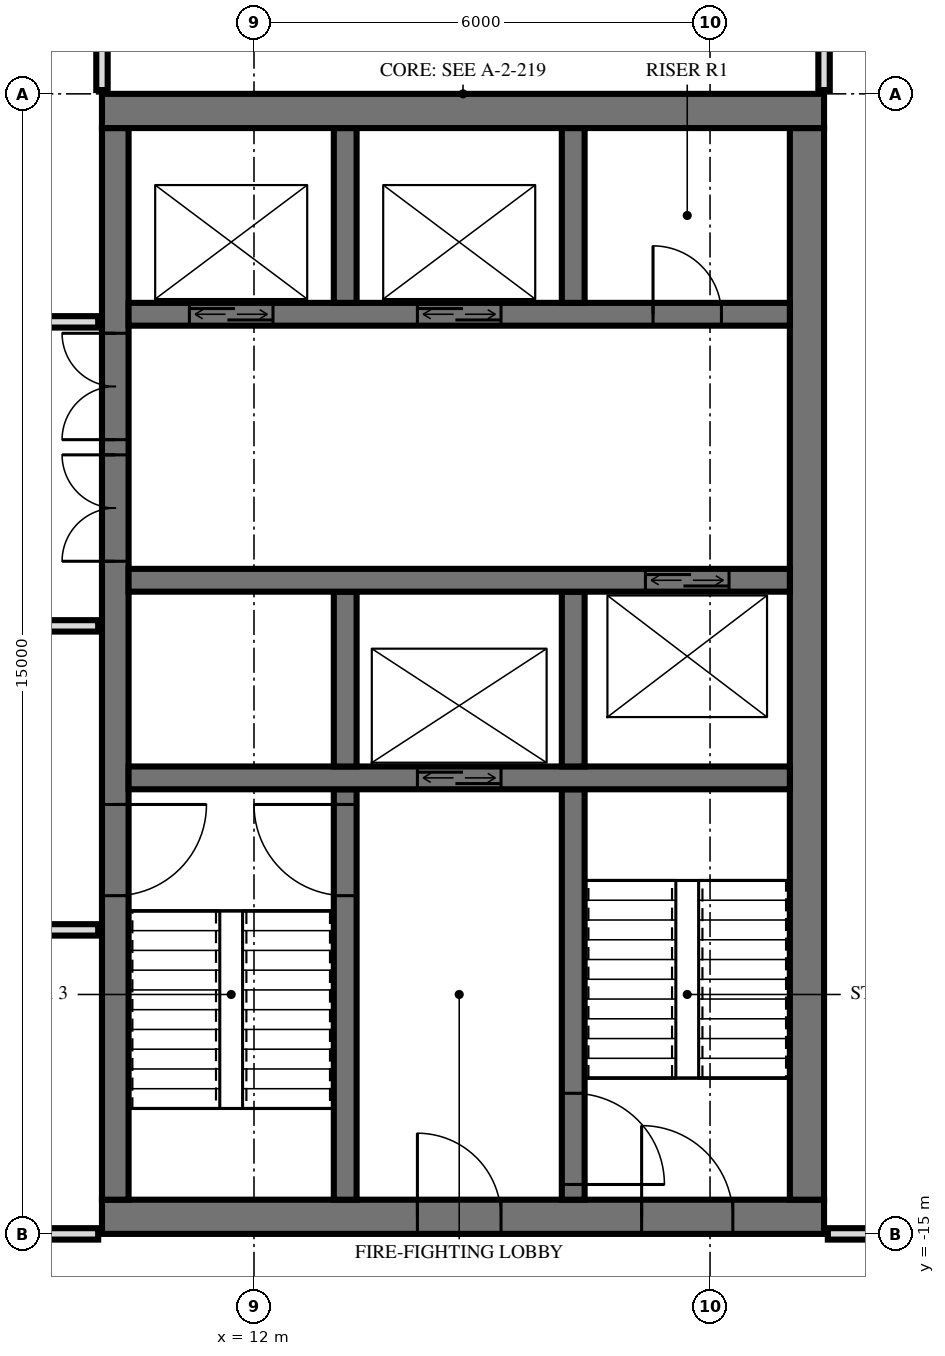
"""IFC4 building model, lengths in metres.
Left out: names, types, materials, properties, quantities, classifications, styles, units other than length and angle.
Written with IfcOpenShell. Run it as: python <this file> out.ifc"""

import sys

from ifc_helpers import new_model, si_unit, direction, frame, frame_2d, origin, place, context, subcontext, project, spatial, rectangle, extrude, element, fill, save


model = new_model("IFC4")
c1 = context("Model", 3, precision=1e-05, world=origin(), true_north=direction((0.0, 1.0)))
c2 = subcontext(c1, "Body", "Model", "MODEL_VIEW")
j1 = project(units=[si_unit("LENGTHUNIT", "METRE"), si_unit("PLANEANGLEUNIT", "RADIAN")], contexts=[c1])
p1 = place(None, origin())
s1 = spatial("IfcSite", under=j1, at=p1, CompositionType="ELEMENT")
p2 = place(p1, origin())
s2 = spatial("IfcBuilding", under=s1, at=p2, CompositionType="ELEMENT")
p3 = place(p2, frame((0.0, 0.0, 318.6)))
s3 = spatial("IfcBuildingStorey", under=s2, at=p3, CompositionType="ELEMENT", Elevation=318.6)
p4 = place(p3, frame((10.0, -0.225, 0.0), z_axis=(0.0, 0.0, 1.0), x_axis=(1.0, 0.0, 0.0)))
e1 = element("IfcWall", 1, at=p4, inside=s3, PredefinedType="SHEAR", context=c2, shape_type="SweptSolid", body=[
    extrude(rectangle(XDim=9.5, YDim=0.45, at=frame_2d((4.75, 0.0))), origin(), (0.0, 0.0, 1.0), 4.0),
])
p5 = place(p3, frame((10.0, -14.775, 0.0), z_axis=(0.0, 0.0, 1.0), x_axis=(1.0, 0.0, 0.0)))
e2 = element("IfcWall", 2, at=p5, inside=s3, PredefinedType="SHEAR", context=c2, shape_type="SweptSolid", body=[
    extrude(rectangle(XDim=9.5, YDim=0.45, at=frame_2d((4.75, 0.0))), origin(), (0.0, 0.0, 1.0), 4.0),
])
p6 = place(p5, frame((7.1, 0.0, 0.0)))
e3 = element("IfcOpeningElement", 3, at=p6, cuts=e2, PredefinedType="OPENING", context=c2, shape_type="SweptSolid", body=[
    extrude(rectangle(XDim=1.2, YDim=2.1, at=frame_2d((0.6, 1.05))), frame((0.0, 0.235, 0.0), z_axis=(0.0, -1.0, 0.0), x_axis=(1.0, 0.0, 0.0)), (0.0, 0.0, 1.0), 0.47),
])
p7 = place(p5, frame((4.15, 0.0, 0.0)))
e4 = element("IfcOpeningElement", 4, at=p7, cuts=e2, PredefinedType="OPENING", context=c2, shape_type="SweptSolid", body=[
    extrude(rectangle(XDim=1.1, YDim=2.1, at=frame_2d((0.55, 1.05))), frame((0.0, 0.235, 0.0), z_axis=(0.0, -1.0, 0.0), x_axis=(1.0, 0.0, 0.0)), (0.0, 0.0, 1.0), 0.47),
])
p8 = place(p3, frame((10.175, -14.55, 0.0), z_axis=(0.0, 0.0, 1.0), x_axis=(0.0, 1.0, 0.0)))
e5 = element("IfcWall", 5, at=p8, inside=s3, PredefinedType="SHEAR", context=c2, shape_type="SweptSolid", body=[
    extrude(rectangle(XDim=14.1, YDim=0.35, at=frame_2d((7.05, 0.0))), origin(), (0.0, 0.0, 1.0), 4.0),
])
p9 = place(p8, frame((8.4, 0.0, 0.0)))
e6 = element("IfcOpeningElement", 6, at=p9, cuts=e5, PredefinedType="OPENING", context=c2, shape_type="SweptSolid", body=[
    extrude(rectangle(XDim=1.4, YDim=2.4, at=frame_2d((0.7, 1.2))), frame((0.0, 0.185, 0.0), z_axis=(0.0, -1.0, 0.0), x_axis=(1.0, 0.0, 0.0)), (0.0, 0.0, 1.0), 0.37),
])
p10 = place(p8, frame((10.0, 0.0, 0.0)))
e7 = element("IfcOpeningElement", 7, at=p10, cuts=e5, PredefinedType="OPENING", context=c2, shape_type="SweptSolid", body=[
    extrude(rectangle(XDim=1.4, YDim=2.4, at=frame_2d((0.7, 1.2))), frame((0.0, 0.185, 0.0), z_axis=(0.0, -1.0, 0.0), x_axis=(1.0, 0.0, 0.0)), (0.0, 0.0, 1.0), 0.37),
])
p11 = place(p8, frame((4.0, 0.0, 0.0)))
e8 = element("IfcOpeningElement", 8, at=p11, cuts=e5, PredefinedType="OPENING", context=c2, shape_type="SweptSolid", body=[
    extrude(rectangle(XDim=1.2, YDim=2.1, at=frame_2d((0.6, 1.05))), frame((0.0, 0.185, 0.0), z_axis=(0.0, -1.0, 0.0), x_axis=(1.0, 0.0, 0.0)), (0.0, 0.0, 1.0), 0.37),
])
p12 = place(p3, frame((19.275, -14.55, 0.0), z_axis=(0.0, 0.0, 1.0), x_axis=(0.0, 1.0, 0.0)))
e9 = element("IfcWall", 9, at=p12, inside=s3, PredefinedType="SHEAR", context=c2, shape_type="SweptSolid", body=[
    extrude(rectangle(XDim=14.1, YDim=0.45, at=frame_2d((7.05, 0.0))), origin(), (0.0, 0.0, 1.0), 4.0),
])
p13 = place(p3, frame((10.35, -2.9, 0.0), z_axis=(0.0, 0.0, 1.0), x_axis=(1.0, 0.0, 0.0)))
e10 = element("IfcWall", 10, at=p13, inside=s3, PredefinedType="SHEAR", context=c2, shape_type="SweptSolid", body=[
    extrude(rectangle(XDim=8.7, YDim=0.3, at=frame_2d((4.35, 0.0))), origin(), (0.0, 0.0, 1.0), 4.0),
])
p14 = place(p13, frame((0.8, 0.0, 0.0)))
e11 = element("IfcOpeningElement", 11, at=p14, cuts=e10, PredefinedType="OPENING", context=c2, shape_type="SweptSolid", body=[
    extrude(rectangle(XDim=1.1, YDim=2.1, at=frame_2d((0.55, 1.05))), frame((0.0, 0.16, 0.0), z_axis=(0.0, -1.0, 0.0), x_axis=(1.0, 0.0, 0.0)), (0.0, 0.0, 1.0), 0.32),
])
p15 = place(p13, frame((3.8, 0.0, 0.0)))
e12 = element("IfcOpeningElement", 12, at=p15, cuts=e10, PredefinedType="OPENING", context=c2, shape_type="SweptSolid", body=[
    extrude(rectangle(XDim=1.1, YDim=2.1, at=frame_2d((0.55, 1.05))), frame((0.0, 0.16, 0.0), z_axis=(0.0, -1.0, 0.0), x_axis=(1.0, 0.0, 0.0)), (0.0, 0.0, 1.0), 0.32),
])
p16 = place(p13, frame((6.9, 0.0, 0.0)))
e13 = element("IfcOpeningElement", 13, at=p16, cuts=e10, PredefinedType="OPENING", context=c2, shape_type="SweptSolid", body=[
    extrude(rectangle(XDim=0.9, YDim=2.1, at=frame_2d((0.45, 1.05))), frame((0.0, 0.16, 0.0), z_axis=(0.0, -1.0, 0.0), x_axis=(1.0, 0.0, 0.0)), (0.0, 0.0, 1.0), 0.32),
])
p17 = place(p3, frame((10.35, -6.4, 0.0), z_axis=(0.0, 0.0, 1.0), x_axis=(1.0, 0.0, 0.0)))
e14 = element("IfcWall", 14, at=p17, inside=s3, PredefinedType="SHEAR", context=c2, shape_type="SweptSolid", body=[
    extrude(rectangle(XDim=8.7, YDim=0.3, at=frame_2d((4.35, 0.0))), origin(), (0.0, 0.0, 1.0), 4.0),
])
p18 = place(p17, frame((6.8, 0.0, 0.0)))
e15 = element("IfcOpeningElement", 15, at=p18, cuts=e14, PredefinedType="OPENING", context=c2, shape_type="SweptSolid", body=[
    extrude(rectangle(XDim=1.1, YDim=2.1, at=frame_2d((0.55, 1.05))), frame((0.0, 0.16, 0.0), z_axis=(0.0, -1.0, 0.0), x_axis=(1.0, 0.0, 0.0)), (0.0, 0.0, 1.0), 0.32),
])
p19 = place(p3, frame((10.35, -9.0, 0.0), z_axis=(0.0, 0.0, 1.0), x_axis=(1.0, 0.0, 0.0)))
e16 = element("IfcWall", 16, at=p19, inside=s3, PredefinedType="SHEAR", context=c2, shape_type="SweptSolid", body=[
    extrude(rectangle(XDim=8.7, YDim=0.3, at=frame_2d((4.35, 0.0))), origin(), (0.0, 0.0, 1.0), 4.0),
])
p20 = place(p19, frame((3.8, 0.0, 0.0)))
e17 = element("IfcOpeningElement", 17, at=p20, cuts=e16, PredefinedType="OPENING", context=c2, shape_type="SweptSolid", body=[
    extrude(rectangle(XDim=1.1, YDim=2.1, at=frame_2d((0.55, 1.05))), frame((0.0, 0.16, 0.0), z_axis=(0.0, -1.0, 0.0), x_axis=(1.0, 0.0, 0.0)), (0.0, 0.0, 1.0), 0.32),
])
for number, where, z_axis, x_axis in (
    (18, (13.2, -2.75, 0.0), (0.0, 0.0, 1.0), (0.0, 1.0, 0.0)),
    (19, (13.2, -8.85, 0.0), (0.0, 0.0, 1.0), (0.0, 1.0, 0.0)),
):
    element("IfcWall", number, at=place(p3, frame(where, z_axis=z_axis, x_axis=x_axis)), inside=s3, PredefinedType="SHEAR", context=c2, shape_type="SweptSolid", body=[
        extrude(rectangle(XDim=2.3, YDim=0.3, at=frame_2d((1.15, 0.0))), origin(), (0.0, 0.0, 1.0), 4.0),
    ])
p21 = place(p3, frame((13.2, -14.55, 0.0), z_axis=(0.0, 0.0, 1.0), x_axis=(0.0, 1.0, 0.0)))
e20 = element("IfcWall", 20, at=p21, inside=s3, PredefinedType="SHEAR", context=c2, shape_type="SweptSolid", body=[
    extrude(rectangle(XDim=5.4, YDim=0.3, at=frame_2d((2.7, 0.0))), origin(), (0.0, 0.0, 1.0), 4.0),
])
p22 = place(p21, frame((4.0, 0.0, 0.0)))
e21 = element("IfcOpeningElement", 21, at=p22, cuts=e20, PredefinedType="OPENING", context=c2, shape_type="SweptSolid", body=[
    extrude(rectangle(XDim=1.2, YDim=2.1, at=frame_2d((0.6, 1.05))), frame((0.0, 0.16, 0.0), z_axis=(0.0, -1.0, 0.0), x_axis=(1.0, 0.0, 0.0)), (0.0, 0.0, 1.0), 0.32),
])
for number, where, z_axis, x_axis in (
    (22, (16.2, -2.75, 0.0), (0.0, 0.0, 1.0), (0.0, 1.0, 0.0)),
    (23, (16.2, -8.85, 0.0), (0.0, 0.0, 1.0), (0.0, 1.0, 0.0)),
):
    element("IfcWall", number, at=place(p3, frame(where, z_axis=z_axis, x_axis=x_axis)), inside=s3, PredefinedType="SHEAR", context=c2, shape_type="SweptSolid", body=[
        extrude(rectangle(XDim=2.3, YDim=0.3, at=frame_2d((1.15, 0.0))), origin(), (0.0, 0.0, 1.0), 4.0),
    ])
p23 = place(p3, frame((16.2, -14.55, 0.0), z_axis=(0.0, 0.0, 1.0), x_axis=(0.0, 1.0, 0.0)))
e24 = element("IfcWall", 24, at=p23, inside=s3, PredefinedType="SHEAR", context=c2, shape_type="SweptSolid", body=[
    extrude(rectangle(XDim=5.4, YDim=0.3, at=frame_2d((2.7, 0.0))), origin(), (0.0, 0.0, 1.0), 4.0),
])
p24 = place(p23, frame((0.2, 0.0, 0.0)))
e25 = element("IfcOpeningElement", 25, at=p24, cuts=e24, PredefinedType="OPENING", context=c2, shape_type="SweptSolid", body=[
    extrude(rectangle(XDim=1.2, YDim=2.1, at=frame_2d((0.6, 1.05))), frame((0.0, 0.16, 0.0), z_axis=(0.0, -1.0, 0.0), x_axis=(1.0, 0.0, 0.0)), (0.0, 0.0, 1.0), 0.32),
])
p25 = place(p3, frame((19.5, 0.05, 0.0), z_axis=(0.0, 0.0, 1.0), x_axis=(0.0, 1.0, 0.0)))
e26 = element("IfcWall", 26, at=p25, inside=s3, PredefinedType="PARTITIONING", context=c2, shape_type="SweptSolid", body=[
    extrude(rectangle(XDim=4.403, YDim=0.15, at=frame_2d((2.202, 0.0))), origin(), (0.0, 0.0, 1.0), 3.72),
])
p26 = place(p3, frame((10.0, 0.05, 0.0), z_axis=(0.0, 0.0, 1.0), x_axis=(0.0, 1.0, 0.0)))
e27 = element("IfcWall", 27, at=p26, inside=s3, PredefinedType="PARTITIONING", context=c2, shape_type="SweptSolid", body=[
    extrude(rectangle(XDim=4.702, YDim=0.15, at=frame_2d((2.351, 0.0))), origin(), (0.0, 0.0, 1.0), 3.72),
])
p27 = place(p3, frame((-3.506, -15.0, 0.0), z_axis=(0.0, 0.0, 1.0), x_axis=(1.0, 0.0, 0.0)))
e28 = element("IfcWall", 28, at=p27, inside=s3, PredefinedType="PARTITIONING", context=c2, shape_type="SweptSolid", body=[
    extrude(rectangle(XDim=13.456, YDim=0.15, at=frame_2d((6.728, 0.0))), origin(), (0.0, 0.0, 1.0), 3.084),
])
p28 = place(p27, frame((6.253, 0.0, 0.0)))
e29 = element("IfcOpeningElement", 29, at=p28, cuts=e28, PredefinedType="OPENING", context=c2, shape_type="SweptSolid", body=[
    extrude(rectangle(XDim=1.0, YDim=2.1, at=frame_2d((0.5, 1.05))), frame((0.0, 0.085, 0.0), z_axis=(0.0, -1.0, 0.0), x_axis=(1.0, 0.0, 0.0)), (0.0, 0.0, 1.0), 0.17),
])
p29 = place(p3, frame((19.55, -15.0, 0.0), z_axis=(0.0, 0.0, 1.0), x_axis=(1.0, 0.0, 0.0)))
e30 = element("IfcWall", 30, at=p29, inside=s3, PredefinedType="PARTITIONING", context=c2, shape_type="SweptSolid", body=[
    extrude(rectangle(XDim=3.49, YDim=0.15, at=frame_2d((1.745, 0.0))), origin(), (0.0, 0.0, 1.0), 3.72),
])
p30 = place(p29, frame((1.311, 0.0, 0.0)))
e31 = element("IfcOpeningElement", 31, at=p30, cuts=e30, PredefinedType="OPENING", context=c2, shape_type="SweptSolid", body=[
    extrude(rectangle(XDim=1.0, YDim=2.1, at=frame_2d((0.5, 1.05))), frame((0.0, 0.085, 0.0), z_axis=(0.0, -1.0, 0.0), x_axis=(1.0, 0.0, 0.0)), (0.0, 0.0, 1.0), 0.17),
])
p31 = place(p3, frame((-9.95, -11.0, 0.0), z_axis=(0.0, 0.0, 1.0), x_axis=(1.0, 0.0, 0.0)))
e32 = element("IfcWall", 32, at=p31, inside=s3, PredefinedType="PARTITIONING", context=c2, shape_type="SweptSolid", body=[
    extrude(rectangle(XDim=19.9, YDim=0.15, at=frame_2d((9.95, 0.0))), origin(), (0.0, 0.0, 1.0), 3.72),
])
p32 = place(p31, frame((9.45, 0.0, 0.0)))
e33 = element("IfcOpeningElement", 33, at=p32, cuts=e32, PredefinedType="OPENING", context=c2, shape_type="SweptSolid", body=[
    extrude(rectangle(XDim=1.0, YDim=2.1, at=frame_2d((0.5, 1.05))), frame((0.0, 0.085, 0.0), z_axis=(0.0, -1.0, 0.0), x_axis=(1.0, 0.0, 0.0)), (0.0, 0.0, 1.0), 0.17),
])
p33 = place(p31, frame((15.45, 0.0, 0.0)))
e34 = element("IfcOpeningElement", 34, at=p33, cuts=e32, PredefinedType="OPENING", context=c2, shape_type="SweptSolid", body=[
    extrude(rectangle(XDim=1.0, YDim=2.1, at=frame_2d((0.5, 1.05))), frame((0.0, 0.085, 0.0), z_axis=(0.0, -1.0, 0.0), x_axis=(1.0, 0.0, 0.0)), (0.0, 0.0, 1.0), 0.17),
])
p34 = place(p3, frame((-9.95, -7.0, 0.0), z_axis=(0.0, 0.0, 1.0), x_axis=(1.0, 0.0, 0.0)))
e35 = element("IfcWall", 35, at=p34, inside=s3, PredefinedType="PARTITIONING", context=c2, shape_type="SweptSolid", body=[
    extrude(rectangle(XDim=19.9, YDim=0.15, at=frame_2d((9.95, 0.0))), origin(), (0.0, 0.0, 1.0), 3.72),
])
p35 = place(p34, frame((9.45, 0.0, 0.0)))
e36 = element("IfcOpeningElement", 36, at=p35, cuts=e35, PredefinedType="OPENING", context=c2, shape_type="SweptSolid", body=[
    extrude(rectangle(XDim=1.0, YDim=2.1, at=frame_2d((0.5, 1.05))), frame((0.0, 0.085, 0.0), z_axis=(0.0, -1.0, 0.0), x_axis=(1.0, 0.0, 0.0)), (0.0, 0.0, 1.0), 0.17),
])
p36 = place(p34, frame((3.45, 0.0, 0.0)))
e37 = element("IfcOpeningElement", 37, at=p36, cuts=e35, PredefinedType="OPENING", context=c2, shape_type="SweptSolid", body=[
    extrude(rectangle(XDim=1.0, YDim=2.1, at=frame_2d((0.5, 1.05))), frame((0.0, 0.085, 0.0), z_axis=(0.0, -1.0, 0.0), x_axis=(1.0, 0.0, 0.0)), (0.0, 0.0, 1.0), 0.17),
])
p37 = place(p3, frame((-9.95, -3.0, 0.0), z_axis=(0.0, 0.0, 1.0), x_axis=(1.0, 0.0, 0.0)))
e38 = element("IfcWall", 38, at=p37, inside=s3, PredefinedType="PARTITIONING", context=c2, shape_type="SweptSolid", body=[
    extrude(rectangle(XDim=19.9, YDim=0.15, at=frame_2d((9.95, 0.0))), origin(), (0.0, 0.0, 1.0), 3.72),
])
p38 = place(p37, frame((1.95, 0.0, 0.0)))
e39 = element("IfcOpeningElement", 39, at=p38, cuts=e38, PredefinedType="OPENING", context=c2, shape_type="SweptSolid", body=[
    extrude(rectangle(XDim=1.0, YDim=2.1, at=frame_2d((0.5, 1.05))), frame((0.0, 0.085, 0.0), z_axis=(0.0, -1.0, 0.0), x_axis=(1.0, 0.0, 0.0)), (0.0, 0.0, 1.0), 0.17),
])
p39 = place(p37, frame((5.95, 0.0, 0.0)))
e40 = element("IfcOpeningElement", 40, at=p39, cuts=e38, PredefinedType="OPENING", context=c2, shape_type="SweptSolid", body=[
    extrude(rectangle(XDim=1.0, YDim=2.1, at=frame_2d((0.5, 1.05))), frame((0.0, 0.085, 0.0), z_axis=(0.0, -1.0, 0.0), x_axis=(1.0, 0.0, 0.0)), (0.0, 0.0, 1.0), 0.17),
])
p40 = place(p37, frame((8.7, 0.0, 0.0)))
e41 = element("IfcOpeningElement", 41, at=p40, cuts=e38, PredefinedType="OPENING", context=c2, shape_type="SweptSolid", body=[
    extrude(rectangle(XDim=1.0, YDim=2.1, at=frame_2d((0.5, 1.05))), frame((0.0, 0.085, 0.0), z_axis=(0.0, -1.0, 0.0), x_axis=(1.0, 0.0, 0.0)), (0.0, 0.0, 1.0), 0.17),
])
p41 = place(p37, frame((14.7, 0.0, 0.0)))
e42 = element("IfcOpeningElement", 42, at=p41, cuts=e38, PredefinedType="OPENING", context=c2, shape_type="SweptSolid", body=[
    extrude(rectangle(XDim=1.0, YDim=2.1, at=frame_2d((0.5, 1.05))), frame((0.0, 0.085, 0.0), z_axis=(0.0, -1.0, 0.0), x_axis=(1.0, 0.0, 0.0)), (0.0, 0.0, 1.0), 0.17),
])
p42 = place(p14, origin())
e43 = element("IfcDoor", 43, at=p42, inside=s3, OperationType="DOUBLE_DOOR_SLIDING", PredefinedType="USERDEFINED", context=c2, shape_type="SweptSolid", body=[
    extrude(rectangle(XDim=1.1, YDim=2.1, at=frame_2d((0.55, 1.05))), frame((0.0, 0.025, 0.0), z_axis=(0.0, -1.0, 0.0), x_axis=(1.0, 0.0, 0.0)), (0.0, 0.0, 1.0), 0.05),
])
fill(e11, e43)
p43 = place(p15, origin())
e44 = element("IfcDoor", 44, at=p43, inside=s3, OperationType="DOUBLE_DOOR_SLIDING", PredefinedType="USERDEFINED", context=c2, shape_type="SweptSolid", body=[
    extrude(rectangle(XDim=1.1, YDim=2.1, at=frame_2d((0.55, 1.05))), frame((0.0, 0.025, 0.0), z_axis=(0.0, -1.0, 0.0), x_axis=(1.0, 0.0, 0.0)), (0.0, 0.0, 1.0), 0.05),
])
fill(e12, e44)
p44 = place(p20, origin())
e45 = element("IfcDoor", 45, at=p44, inside=s3, OperationType="DOUBLE_DOOR_SLIDING", PredefinedType="USERDEFINED", context=c2, shape_type="SweptSolid", body=[
    extrude(rectangle(XDim=1.1, YDim=2.1, at=frame_2d((0.55, 1.05))), frame((0.0, 0.025, 0.0), z_axis=(0.0, -1.0, 0.0), x_axis=(1.0, 0.0, 0.0)), (0.0, 0.0, 1.0), 0.05),
])
fill(e17, e45)
p45 = place(p18, origin())
e46 = element("IfcDoor", 46, at=p45, inside=s3, OperationType="DOUBLE_DOOR_SLIDING", PredefinedType="USERDEFINED", context=c2, shape_type="SweptSolid", body=[
    extrude(rectangle(XDim=1.1, YDim=2.1, at=frame_2d((0.55, 1.05))), frame((0.0, 0.025, 0.0), z_axis=(0.0, -1.0, 0.0), x_axis=(1.0, 0.0, 0.0)), (0.0, 0.0, 1.0), 0.05),
])
fill(e15, e46)
p46 = place(p9, origin())
e47 = element("IfcDoor", 47, at=p46, inside=s3, OperationType="DOUBLE_DOOR_SINGLE_SWING", PredefinedType="DOOR", context=c2, shape_type="SweptSolid", body=[
    extrude(rectangle(XDim=1.4, YDim=2.4, at=frame_2d((0.7, 1.2))), frame((0.0, 0.025, 0.0), z_axis=(0.0, -1.0, 0.0), x_axis=(1.0, 0.0, 0.0)), (0.0, 0.0, 1.0), 0.05),
])
fill(e6, e47)
p47 = place(p10, origin())
e48 = element("IfcDoor", 48, at=p47, inside=s3, OperationType="DOUBLE_DOOR_SINGLE_SWING", PredefinedType="DOOR", context=c2, shape_type="SweptSolid", body=[
    extrude(rectangle(XDim=1.4, YDim=2.4, at=frame_2d((0.7, 1.2))), frame((0.0, 0.025, 0.0), z_axis=(0.0, -1.0, 0.0), x_axis=(1.0, 0.0, 0.0)), (0.0, 0.0, 1.0), 0.05),
])
fill(e7, e48)
p48 = place(p11, frame((0.6, 0.0, 0.0), z_axis=(0.0, 0.0, 1.0), x_axis=(-1.0, 0.0, 0.0)))
e49 = element("IfcDoor", 49, at=p48, inside=s3, OperationType="SINGLE_SWING_RIGHT", PredefinedType="DOOR", context=c2, shape_type="SweptSolid", body=[
    extrude(rectangle(XDim=1.2, YDim=2.1, at=frame_2d((0.0, 1.05))), frame((0.0, -0.025, 0.0), z_axis=(0.0, 1.0, 0.0), x_axis=(-1.0, 0.0, 0.0)), (0.0, 0.0, 1.0), 0.05),
])
fill(e8, e49)
p49 = place(p6, origin())
e50 = element("IfcDoor", 50, at=p49, inside=s3, OperationType="SINGLE_SWING_RIGHT", PredefinedType="DOOR", context=c2, shape_type="SweptSolid", body=[
    extrude(rectangle(XDim=1.2, YDim=2.1, at=frame_2d((0.6, 1.05))), frame((0.0, 0.025, 0.0), z_axis=(0.0, -1.0, 0.0), x_axis=(1.0, 0.0, 0.0)), (0.0, 0.0, 1.0), 0.05),
])
fill(e3, e50)
p50 = place(p7, origin())
e51 = element("IfcDoor", 51, at=p50, inside=s3, OperationType="SINGLE_SWING_RIGHT", PredefinedType="DOOR", context=c2, shape_type="SweptSolid", body=[
    extrude(rectangle(XDim=1.1, YDim=2.1, at=frame_2d((0.55, 1.05))), frame((0.0, 0.025, 0.0), z_axis=(0.0, -1.0, 0.0), x_axis=(1.0, 0.0, 0.0)), (0.0, 0.0, 1.0), 0.05),
])
fill(e4, e51)
p51 = place(p16, origin())
e52 = element("IfcDoor", 52, at=p51, inside=s3, OperationType="SINGLE_SWING_RIGHT", PredefinedType="DOOR", context=c2, shape_type="SweptSolid", body=[
    extrude(rectangle(XDim=0.9, YDim=2.1, at=frame_2d((0.45, 1.05))), frame((0.0, 0.025, 0.0), z_axis=(0.0, -1.0, 0.0), x_axis=(1.0, 0.0, 0.0)), (0.0, 0.0, 1.0), 0.05),
])
fill(e13, e52)
p52 = place(p22, origin())
e53 = element("IfcDoor", 53, at=p52, inside=s3, OperationType="SINGLE_SWING_LEFT", PredefinedType="DOOR", context=c2, shape_type="SweptSolid", body=[
    extrude(rectangle(XDim=1.2, YDim=2.1, at=frame_2d((0.6, 1.05))), frame((0.0, 0.025, 0.0), z_axis=(0.0, -1.0, 0.0), x_axis=(1.0, 0.0, 0.0)), (0.0, 0.0, 1.0), 0.05),
])
fill(e21, e53)
p53 = place(p24, frame((0.6, 0.0, 0.0), z_axis=(0.0, 0.0, 1.0), x_axis=(-1.0, 0.0, 0.0)))
e54 = element("IfcDoor", 54, at=p53, inside=s3, OperationType="SINGLE_SWING_LEFT", PredefinedType="DOOR", context=c2, shape_type="SweptSolid", body=[
    extrude(rectangle(XDim=1.2, YDim=2.1, at=frame_2d((0.0, 1.05))), frame((0.0, -0.025, 0.0), z_axis=(0.0, 1.0, 0.0), x_axis=(-1.0, 0.0, 0.0)), (0.0, 0.0, 1.0), 0.05),
])
fill(e25, e54)
save(model, sys.argv[1])
